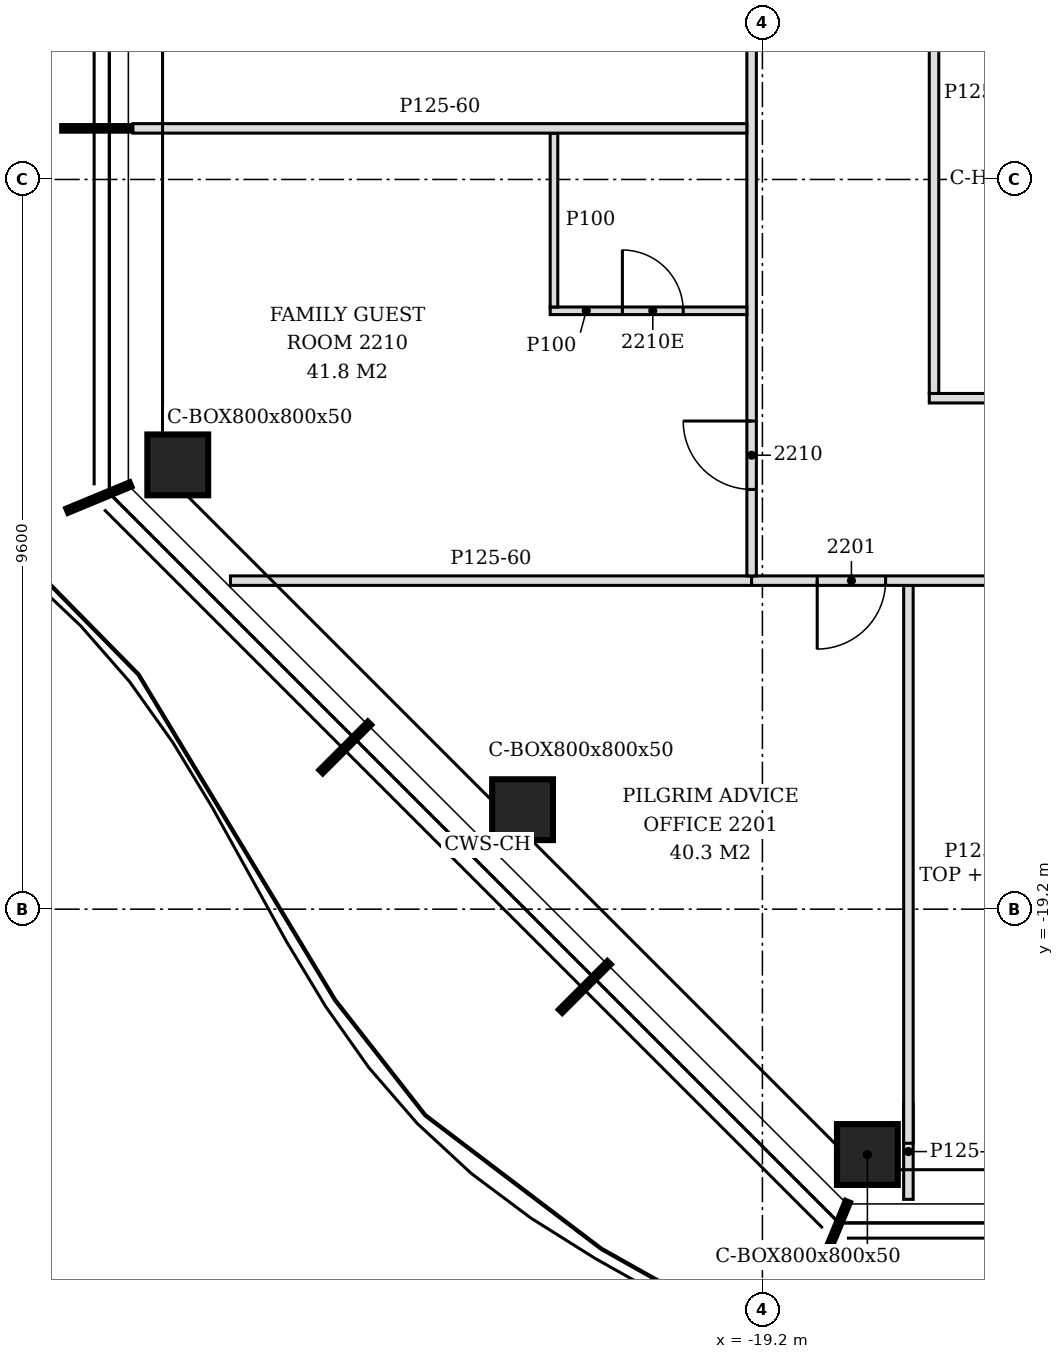
"""IFC4 building model, lengths in metres.
Left out: names, types, materials, properties, quantities, classifications, styles, units other than length and angle.
Written with IfcOpenShell. Run it as: python <this file> out.ifc"""

import sys

from ifc_helpers import new_model, si_unit, direction, frame, frame_2d, origin, origin_2d, place, context, subcontext, project, spatial, polyline, rectangle, hollow_rectangle, outline, extrude, clip, halfspace, element, fill, save


model = new_model("IFC4")
c1 = context("Model", 3, precision=1e-05, world=origin(), true_north=direction((0.0, 1.0)))
c2 = subcontext(c1, "Body", "Model", "MODEL_VIEW")
j1 = project(units=[si_unit("LENGTHUNIT", "METRE"), si_unit("PLANEANGLEUNIT", "RADIAN")], contexts=[c1])
p1 = place(None, origin())
s1 = spatial("IfcSite", under=j1, at=p1, CompositionType="ELEMENT")
p2 = place(p1, origin())
s2 = spatial("IfcBuilding", under=s1, at=p2, CompositionType="ELEMENT")
p3 = place(p2, frame((0.0, 0.0, 94.2)))
s3 = spatial("IfcBuildingStorey", under=s2, at=p3, CompositionType="ELEMENT", Elevation=94.2)
for number, where, z_axis, x_axis in (
    (1, (-17.819, -22.428, -0.15), (0.282, 0.188, 0.941), (-0.555, 0.832, 0.0)),
    (2, (-26.892, -13.355, -0.15), (0.282, 0.188, 0.941), (-0.555, 0.832, 0.0)),
    (3, (-22.355, -17.891, -0.15), (0.282, 0.188, 0.941), (-0.555, 0.832, 0.0)),
):
    element("IfcColumn", number, at=place(p3, frame(where, z_axis=z_axis, x_axis=x_axis)), inside=s3, PredefinedType="COLUMN", context=c2, shape_type="Clipping", body=[
        clip(clip(extrude(hollow_rectangle(XDim=0.8, YDim=0.8, WallThickness=0.05, at=origin_2d()), origin(), (0.0, 0.0, 1.0), 3.826), halfspace(frame((0.0, 0.0, 0.024), z_axis=(0.0, 0.0, 1.0), x_axis=(1.0, 0.0, 0.0)), True)), halfspace(frame((0.0, 0.0, 3.802), z_axis=(0.0, 0.0, 1.0), x_axis=(1.0, 0.0, 0.0)), False)),
    ])
p4 = place(p3, frame((-17.279, -23.018, 0.0), z_axis=(0.0, 0.0, 1.0), x_axis=(0.0, 1.0, 0.0)))
e4 = element("IfcWall", 4, at=p4, inside=s3, PredefinedType="PARTITIONING", context=c2, shape_type="SweptSolid", body=[
    extrude(outline(polyline([(0.0, 0.0), (0.427, 0.0), (0.427, 0.863), (0.427, 1.725), (0.697, 2.588), (1.257, 3.45), (0.0, 3.45), (0.0, 2.588), (0.0, 1.725), (0.0, 0.863), (0.0, 0.0)])), frame((0.0, 0.062, 0.0), z_axis=(0.0, -1.0, 0.0), x_axis=(1.0, 0.0, 0.0)), (0.0, 0.0, 1.0), 0.125),
])
p5 = place(p3, frame((-17.279, -22.28, 0.0), z_axis=(0.0, 0.0, 1.0), x_axis=(0.0, 1.0, 0.0)))
e5 = element("IfcWall", 5, at=p5, inside=s3, PredefinedType="PARTITIONING", context=c2, shape_type="SweptSolid", body=[
    extrude(outline(polyline([(0.0, 0.0), (7.339, 0.0), (7.339, 0.863), (7.339, 1.725), (7.339, 2.588), (7.339, 2.63), (0.734, 2.63), (0.734, 2.588), (0.734, 1.725), (0.56, 0.863), (0.0, 0.0)])), frame((0.0, 0.062, 0.0), z_axis=(0.0, -1.0, 0.0), x_axis=(1.0, 0.0, 0.0)), (0.0, 0.0, 1.0), 0.125),
])
p6 = place(p3, frame((-26.198, -14.878, 0.0), z_axis=(0.0, 0.0, 1.0), x_axis=(1.0, 0.0, 0.0)))
e6 = element("IfcWall", 6, at=p6, inside=s3, PredefinedType="PARTITIONING", context=c2, shape_type="SweptSolid", body=[
    extrude(outline(polyline([(0.0, 0.0), (6.856, 0.0), (6.856, 3.45), (2.902, 3.45), (2.9, 2.93), (2.353, 2.93), (2.351, 3.45), (0.0, 3.45), (0.0, 0.0)])), frame((0.0, 0.062, 0.0), z_axis=(0.0, -1.0, 0.0), x_axis=(1.0, 0.0, 0.0)), (0.0, 0.0, 1.0), 0.125),
])
p7 = place(p3, frame((-19.342, -14.878, 0.0), z_axis=(0.0, 0.0, 1.0), x_axis=(1.0, 0.0, 0.0)))
e7 = element("IfcWall", 7, at=p7, inside=s3, PredefinedType="PARTITIONING", context=c2, shape_type="SweptSolid", body=[
    extrude(outline(polyline([(0.0, 0.0), (38.479, 0.0), (38.479, 2.73), (38.392, 2.73), (38.39, 3.45), (26.692, 3.45), (26.69, 2.73), (26.392, 2.73), (26.39, 3.45), (14.692, 3.45), (14.69, 2.73), (14.392, 2.73), (14.39, 3.45), (5.092, 3.45), (5.09, 2.93), (4.792, 2.93), (4.79, 3.45), (0.0, 3.45), (0.0, 0.0)])), frame((0.0, 0.062, 0.0), z_axis=(0.0, -1.0, 0.0), x_axis=(1.0, 0.0, 0.0)), (0.0, 0.0, 1.0), 0.125),
])
p8 = place(p7, frame((0.863, 0.0, 0.0)))
e8 = element("IfcOpeningElement", 8, at=p8, cuts=e7, PredefinedType="OPENING", context=c2, shape_type="SweptSolid", body=[
    extrude(rectangle(XDim=0.9, YDim=2.1, at=frame_2d((0.45, 1.05))), frame((0.0, 0.073, 0.0), z_axis=(0.0, -1.0, 0.0), x_axis=(1.0, 0.0, 0.0)), (0.0, 0.0, 1.0), 0.145),
])
p9 = place(p7, frame((3.742, 0.0, 0.0)))
e9 = element("IfcOpeningElement", 9, at=p9, cuts=e7, PredefinedType="OPENING", context=c2, shape_type="SweptSolid", body=[
    extrude(rectangle(XDim=0.9, YDim=2.1, at=frame_2d((0.45, 1.05))), frame((0.0, 0.073, 0.0), z_axis=(0.0, -1.0, 0.0), x_axis=(1.0, 0.0, 0.0)), (0.0, 0.0, 1.0), 0.145),
])
p10 = place(p7, frame((7.876, 0.0, 0.0)))
e10 = element("IfcOpeningElement", 10, at=p10, cuts=e7, PredefinedType="OPENING", context=c2, shape_type="SweptSolid", body=[
    extrude(rectangle(XDim=0.9, YDim=2.1, at=frame_2d((0.45, 1.05))), frame((0.0, 0.073, 0.0), z_axis=(0.0, -1.0, 0.0), x_axis=(1.0, 0.0, 0.0)), (0.0, 0.0, 1.0), 0.145),
])
p11 = place(p7, frame((14.35, 0.0, 0.0)))
e11 = element("IfcOpeningElement", 11, at=p11, cuts=e7, PredefinedType="OPENING", context=c2, shape_type="SweptSolid", body=[
    extrude(rectangle(XDim=0.9, YDim=2.1, at=frame_2d((0.45, 1.05))), frame((0.0, 0.073, 0.0), z_axis=(0.0, -1.0, 0.0), x_axis=(1.0, 0.0, 0.0)), (0.0, 0.0, 1.0), 0.145),
])
p12 = place(p7, frame((17.29, 0.0, 0.0)))
e12 = element("IfcOpeningElement", 12, at=p12, cuts=e7, PredefinedType="OPENING", context=c2, shape_type="SweptSolid", body=[
    extrude(rectangle(XDim=0.9, YDim=2.1, at=frame_2d((0.45, 1.05))), frame((0.0, 0.073, 0.0), z_axis=(0.0, -1.0, 0.0), x_axis=(1.0, 0.0, 0.0)), (0.0, 0.0, 1.0), 0.145),
])
p13 = place(p7, frame((23.95, 0.0, 0.0)))
e13 = element("IfcOpeningElement", 13, at=p13, cuts=e7, PredefinedType="OPENING", context=c2, shape_type="SweptSolid", body=[
    extrude(rectangle(XDim=0.9, YDim=2.1, at=frame_2d((0.45, 1.05))), frame((0.0, 0.073, 0.0), z_axis=(0.0, -1.0, 0.0), x_axis=(1.0, 0.0, 0.0)), (0.0, 0.0, 1.0), 0.145),
])
p14 = place(p7, frame((26.703, 0.0, 0.0)))
e14 = element("IfcOpeningElement", 14, at=p14, cuts=e7, PredefinedType="OPENING", context=c2, shape_type="SweptSolid", body=[
    extrude(rectangle(XDim=0.9, YDim=2.1, at=frame_2d((0.45, 1.05))), frame((0.0, 0.073, 0.0), z_axis=(0.0, -1.0, 0.0), x_axis=(1.0, 0.0, 0.0)), (0.0, 0.0, 1.0), 0.145),
])
p15 = place(p7, frame((30.65, 0.0, 0.0)))
e15 = element("IfcOpeningElement", 15, at=p15, cuts=e7, PredefinedType="OPENING", context=c2, shape_type="SweptSolid", body=[
    extrude(rectangle(XDim=0.9, YDim=2.1, at=frame_2d((0.45, 1.05))), frame((0.0, 0.073, 0.0), z_axis=(0.0, -1.0, 0.0), x_axis=(1.0, 0.0, 0.0)), (0.0, 0.0, 1.0), 0.145),
])
p16 = place(p7, frame((36.542, 0.0, 0.0)))
e16 = element("IfcOpeningElement", 16, at=p16, cuts=e7, PredefinedType="OPENING", context=c2, shape_type="SweptSolid", body=[
    extrude(rectangle(XDim=0.9, YDim=2.1, at=frame_2d((0.45, 1.05))), frame((0.0, 0.073, 0.0), z_axis=(0.0, -1.0, 0.0), x_axis=(1.0, 0.0, 0.0)), (0.0, 0.0, 1.0), 0.145),
])
p17 = place(p3, frame((-19.342, -14.815, 0.0), z_axis=(0.0, 0.0, 1.0), x_axis=(0.0, 1.0, 0.0)))
e17 = element("IfcWall", 17, at=p17, inside=s3, PredefinedType="PARTITIONING", context=c2, shape_type="SweptSolid", body=[
    extrude(outline(polyline([(0.0, 0.0), (37.876, 0.0), (37.876, 3.45), (37.262, 3.45), (37.26, 2.63), (36.147, 2.63), (36.146, 3.45), (35.502, 3.45), (35.5, 2.98), (35.312, 2.98), (35.31, 3.45), (30.712, 3.45), (30.71, 2.88), (30.502, 2.88), (30.5, 3.45), (25.912, 3.45), (25.91, 2.88), (25.702, 2.88), (25.7, 3.45), (21.112, 3.45), (21.11, 2.88), (20.902, 2.88), (20.9, 3.45), (16.312, 3.45), (16.31, 2.88), (16.102, 2.88), (16.1, 3.45), (11.512, 3.45), (11.51, 2.88), (11.302, 2.88), (11.3, 3.45), (6.712, 3.45), (6.71, 2.88), (6.502, 2.88), (6.5, 3.45), (1.912, 3.45), (1.91, 2.88), (1.702, 2.88), (1.7, 3.45), (0.0, 3.45), (0.0, 0.0)])), frame((0.0, 0.062, 0.0), z_axis=(0.0, -1.0, 0.0), x_axis=(1.0, 0.0, 0.0)), (0.0, 0.0, 1.0), 0.125),
])
p18 = place(p17, frame((1.137, 0.0, 0.0)))
e18 = element("IfcOpeningElement", 18, at=p18, cuts=e17, PredefinedType="OPENING", context=c2, shape_type="SweptSolid", body=[
    extrude(rectangle(XDim=0.9, YDim=2.1, at=frame_2d((0.45, 1.05))), frame((0.0, 0.073, 0.0), z_axis=(0.0, -1.0, 0.0), x_axis=(1.0, 0.0, 0.0)), (0.0, 0.0, 1.0), 0.145),
])
p19 = place(p17, frame((7.488, 0.0, 0.0)))
e19 = element("IfcOpeningElement", 19, at=p19, cuts=e17, PredefinedType="OPENING", context=c2, shape_type="SweptSolid", body=[
    extrude(rectangle(XDim=0.9, YDim=2.1, at=frame_2d((0.45, 1.05))), frame((0.0, 0.073, 0.0), z_axis=(0.0, -1.0, 0.0), x_axis=(1.0, 0.0, 0.0)), (0.0, 0.0, 1.0), 0.145),
])
p20 = place(p17, frame((11.471, 0.0, 0.0)))
e20 = element("IfcOpeningElement", 20, at=p20, cuts=e17, PredefinedType="OPENING", context=c2, shape_type="SweptSolid", body=[
    extrude(rectangle(XDim=0.9, YDim=2.1, at=frame_2d((0.45, 1.05))), frame((0.0, 0.073, 0.0), z_axis=(0.0, -1.0, 0.0), x_axis=(1.0, 0.0, 0.0)), (0.0, 0.0, 1.0), 0.145),
])
p21 = place(p17, frame((15.988, 0.0, 0.0)))
e21 = element("IfcOpeningElement", 21, at=p21, cuts=e17, PredefinedType="OPENING", context=c2, shape_type="SweptSolid", body=[
    extrude(rectangle(XDim=0.9, YDim=2.1, at=frame_2d((0.45, 1.05))), frame((0.0, 0.073, 0.0), z_axis=(0.0, -1.0, 0.0), x_axis=(1.0, 0.0, 0.0)), (0.0, 0.0, 1.0), 0.145),
])
p22 = place(p17, frame((20.823, 0.0, 0.0)))
e22 = element("IfcOpeningElement", 22, at=p22, cuts=e17, PredefinedType="OPENING", context=c2, shape_type="SweptSolid", body=[
    extrude(rectangle(XDim=0.9, YDim=2.1, at=frame_2d((0.45, 1.05))), frame((0.0, 0.073, 0.0), z_axis=(0.0, -1.0, 0.0), x_axis=(1.0, 0.0, 0.0)), (0.0, 0.0, 1.0), 0.145),
])
p23 = place(p17, frame((28.315, 0.0, 0.0)))
e23 = element("IfcOpeningElement", 23, at=p23, cuts=e17, PredefinedType="OPENING", context=c2, shape_type="SweptSolid", body=[
    extrude(rectangle(XDim=0.9, YDim=2.1, at=frame_2d((0.45, 1.05))), frame((0.0, 0.073, 0.0), z_axis=(0.0, -1.0, 0.0), x_axis=(1.0, 0.0, 0.0)), (0.0, 0.0, 1.0), 0.145),
])
p24 = place(p17, frame((30.175, 0.0, 0.0)))
e24 = element("IfcOpeningElement", 24, at=p24, cuts=e17, PredefinedType="OPENING", context=c2, shape_type="SweptSolid", body=[
    extrude(rectangle(XDim=0.9, YDim=2.1, at=frame_2d((0.45, 1.05))), frame((0.0, 0.073, 0.0), z_axis=(0.0, -1.0, 0.0), x_axis=(1.0, 0.0, 0.0)), (0.0, 0.0, 1.0), 0.145),
])
p25 = place(p3, frame((-17.004, -12.478, 0.0), z_axis=(0.0, 0.0, 1.0), x_axis=(1.0, 0.0, 0.0)))
e25 = element("IfcWall", 25, at=p25, inside=s3, PredefinedType="PARTITIONING", context=c2, shape_type="SweptSolid", body=[
    extrude(outline(polyline([(0.0, 0.0), (17.067, 0.0), (17.067, 3.45), (12.354, 3.45), (12.353, 2.73), (12.054, 2.73), (12.052, 3.45), (2.754, 3.45), (2.752, 2.93), (2.455, 2.93), (2.452, 3.45), (0.0, 3.45), (0.0, 0.0)])), frame((0.0, 0.062, 0.0), z_axis=(0.0, -1.0, 0.0), x_axis=(1.0, 0.0, 0.0)), (0.0, 0.0, 1.0), 0.125),
])
p26 = place(p25, frame((10.905, 0.0, 0.0)))
e26 = element("IfcOpeningElement", 26, at=p26, cuts=e25, PredefinedType="OPENING", context=c2, shape_type="SweptSolid", body=[
    extrude(rectangle(XDim=0.9, YDim=2.1, at=frame_2d((0.45, 1.05))), frame((0.0, 0.073, 0.0), z_axis=(0.0, -1.0, 0.0), x_axis=(1.0, 0.0, 0.0)), (0.0, 0.0, 1.0), 0.145),
])
p27 = place(p3, frame((-16.942, -12.416, 0.0), z_axis=(0.0, 0.0, 1.0), x_axis=(0.0, 1.0, 0.0)))
e27 = element("IfcWall", 27, at=p27, inside=s3, PredefinedType="PARTITIONING", context=c2, shape_type="SweptSolid", body=[
    extrude(outline(polyline([(0.0, 0.0), (12.353, 0.0), (12.353, 3.45), (9.112, 3.45), (9.11, 2.88), (8.902, 2.88), (8.9, 3.45), (4.312, 3.45), (4.31, 2.88), (4.102, 2.88), (4.1, 3.45), (0.0, 3.45), (0.0, 0.0)])), frame((0.0, 0.062, 0.0), z_axis=(0.0, -1.0, 0.0), x_axis=(1.0, 0.0, 0.0)), (0.0, 0.0, 1.0), 0.125),
])
p28 = place(p27, frame((7.916, 0.0, 0.0)))
e28 = element("IfcOpeningElement", 28, at=p28, cuts=e27, PredefinedType="OPENING", context=c2, shape_type="SweptSolid", body=[
    extrude(rectangle(XDim=0.8, YDim=2.1, at=frame_2d((0.4, 1.05))), frame((0.0, 0.073, 0.0), z_axis=(0.0, -1.0, 0.0), x_axis=(1.0, 0.0, 0.0)), (0.0, 0.0, 1.0), 0.145),
])
p29 = place(p3, frame((-21.992, -11.328, 0.0), z_axis=(0.0, 0.0, 1.0), x_axis=(1.0, 0.0, 0.0)))
e29 = element("IfcWall", 29, at=p29, inside=s3, PredefinedType="PARTITIONING", context=c2, shape_type="SweptSolid", body=[
    extrude(rectangle(XDim=2.587, YDim=0.1, at=frame_2d((1.294, 0.0))), origin(), (0.0, 0.0, 1.0), 3.45),
])
p30 = place(p29, frame((0.95, 0.0, 0.0)))
e30 = element("IfcOpeningElement", 30, at=p30, cuts=e29, PredefinedType="OPENING", context=c2, shape_type="SweptSolid", body=[
    extrude(rectangle(XDim=0.8, YDim=2.1, at=frame_2d((0.4, 1.05))), frame((0.0, 0.06, 0.0), z_axis=(0.0, -1.0, 0.0), x_axis=(1.0, 0.0, 0.0)), (0.0, 0.0, 1.0), 0.12),
])
p31 = place(p3, frame((-21.942, -11.278, 0.0), z_axis=(0.0, 0.0, 1.0), x_axis=(0.0, 1.0, 0.0)))
e31 = element("IfcWall", 31, at=p31, inside=s3, PredefinedType="PARTITIONING", context=c2, shape_type="SweptSolid", body=[
    extrude(rectangle(XDim=2.288, YDim=0.1, at=frame_2d((1.144, 0.0))), origin(), (0.0, 0.0, 1.0), 3.45),
])
p32 = place(p3, frame((-27.482, -8.928, 0.0), z_axis=(0.0, 0.0, 1.0), x_axis=(1.0, 0.0, 0.0)))
e32 = element("IfcWall", 32, at=p32, inside=s3, PredefinedType="PARTITIONING", context=c2, shape_type="SweptSolid", body=[
    extrude(outline(polyline([(0.0, 0.0), (8.077, 0.0), (8.077, 3.45), (1.819, 3.45), (1.817, 2.93), (1.519, 2.93), (1.517, 3.45), (0.0, 3.45), (0.0, 0.0)])), frame((0.0, 0.062, 0.0), z_axis=(0.0, -1.0, 0.0), x_axis=(1.0, 0.0, 0.0)), (0.0, 0.0, 1.0), 0.125),
])
p33 = place(p8, frame((0.9, 0.0, 0.0), z_axis=(0.0, 0.0, 1.0), x_axis=(-1.0, 0.0, 0.0)))
e33 = element("IfcDoor", 33, at=p33, inside=s3, OperationType="SINGLE_SWING_RIGHT", PredefinedType="DOOR", context=c2, shape_type="SweptSolid", body=[
    extrude(rectangle(XDim=0.9, YDim=2.1, at=frame_2d((0.45, 1.05))), frame((0.0, 0.025, 0.0), z_axis=(0.0, -1.0, 0.0), x_axis=(1.0, 0.0, 0.0)), (0.0, 0.0, 1.0), 0.05),
])
fill(e8, e33)
p34 = place(p18, origin())
e34 = element("IfcDoor", 34, at=p34, inside=s3, OperationType="SINGLE_SWING_RIGHT", PredefinedType="DOOR", context=c2, shape_type="SweptSolid", body=[
    extrude(rectangle(XDim=0.9, YDim=2.1, at=frame_2d((0.45, 1.05))), frame((0.0, 0.025, 0.0), z_axis=(0.0, -1.0, 0.0), x_axis=(1.0, 0.0, 0.0)), (0.0, 0.0, 1.0), 0.05),
])
fill(e18, e34)
p35 = place(p30, origin())
e35 = element("IfcDoor", 35, at=p35, inside=s3, OperationType="SINGLE_SWING_LEFT", PredefinedType="DOOR", context=c2, shape_type="SweptSolid", body=[
    extrude(rectangle(XDim=0.8, YDim=2.1, at=frame_2d((0.4, 1.05))), frame((0.0, 0.025, 0.0), z_axis=(0.0, -1.0, 0.0), x_axis=(1.0, 0.0, 0.0)), (0.0, 0.0, 1.0), 0.05),
])
fill(e30, e35)
save(model, sys.argv[1])
